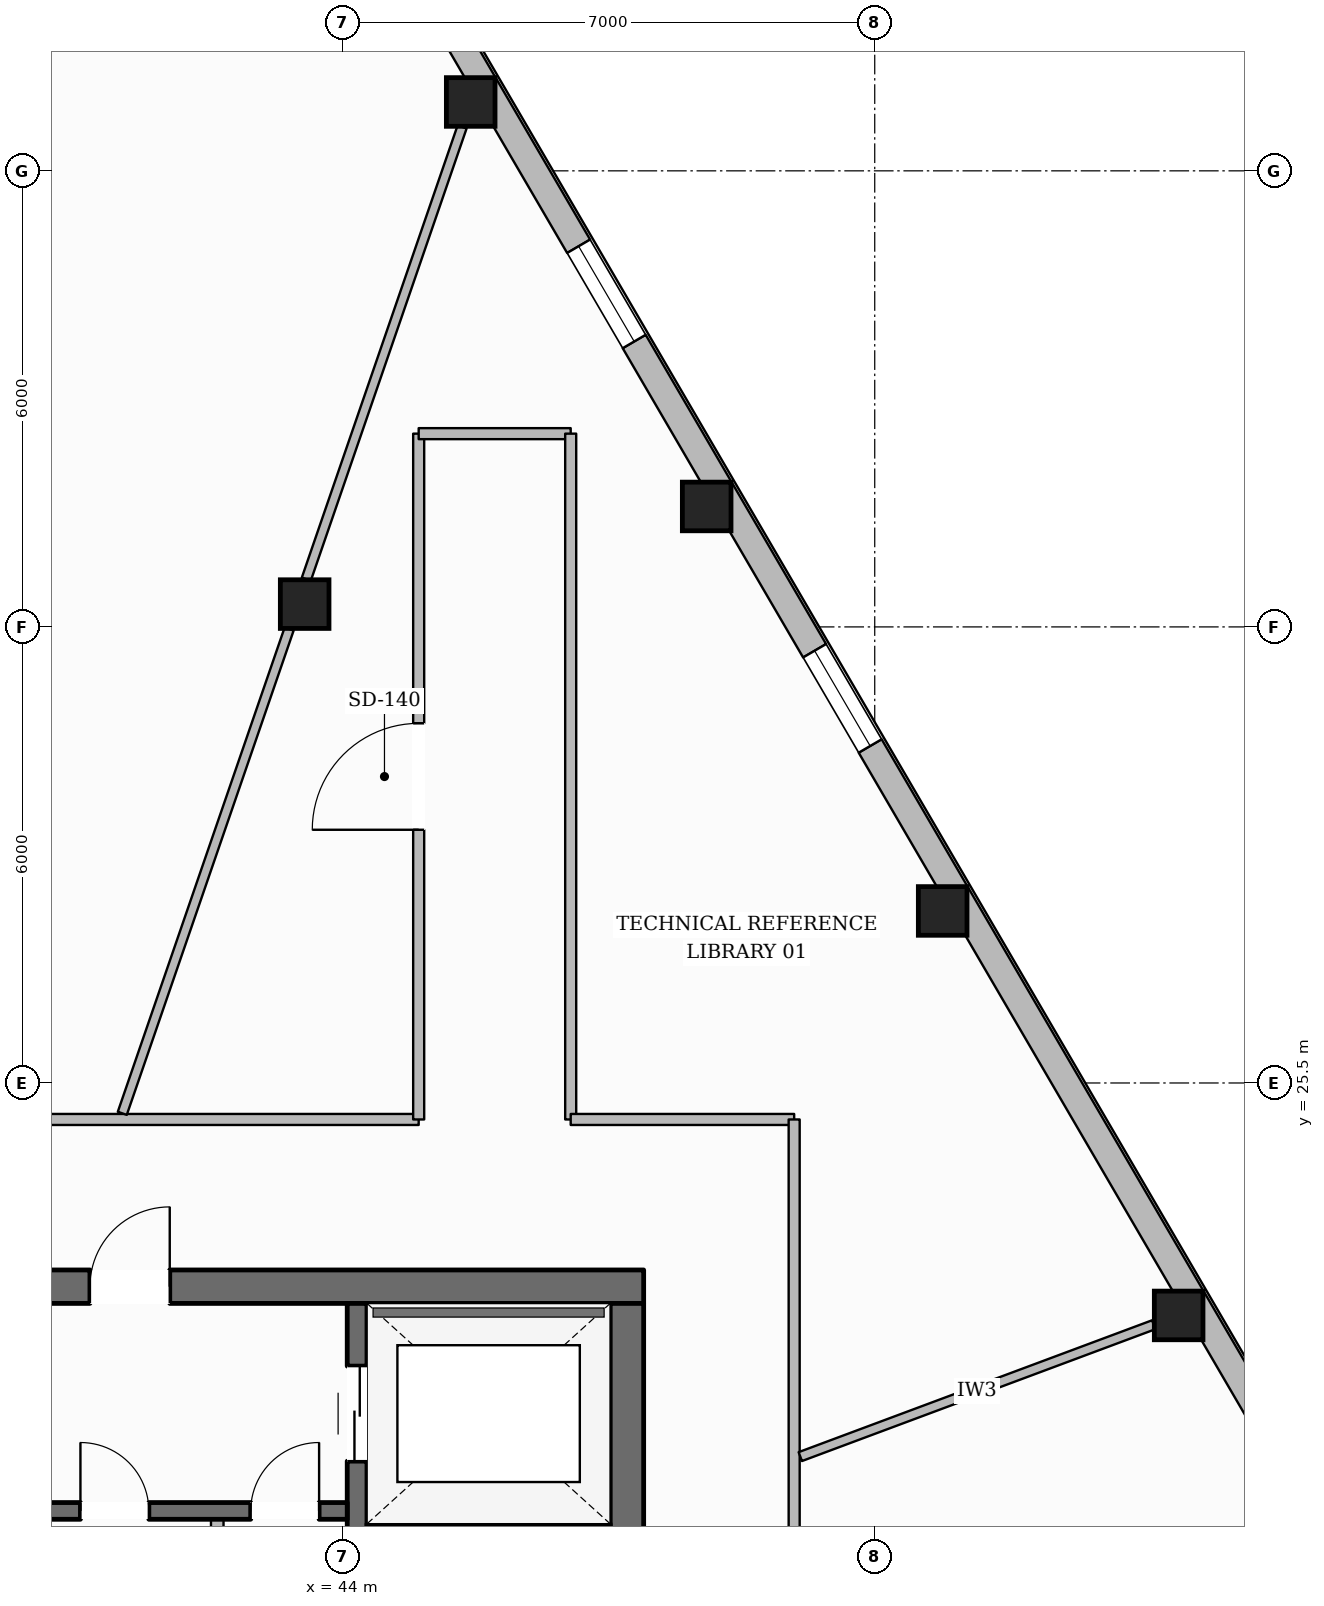
"""IFC4 building model, lengths in metres.
Left out: names, types, materials, properties, quantities, classifications, styles, units other than length and angle.
Written with IfcOpenShell. Run it as: python <this file> out.ifc"""

import sys

from ifc_helpers import new_model, si_unit, direction, frame, frame_2d, origin, origin_2d, place, context, subcontext, project, spatial, rectangle, hollow_rectangle, extrude, element, fill, save


model = new_model("IFC4")
c1 = context("Model", 3, precision=1e-05, world=origin(), true_north=direction((0.0, 1.0)))
c2 = subcontext(c1, "Body", "Model", "MODEL_VIEW")
j1 = project(units=[si_unit("LENGTHUNIT", "METRE"), si_unit("PLANEANGLEUNIT", "RADIAN")], contexts=[c1])
p1 = place(None, origin())
s1 = spatial("IfcSite", under=j1, at=p1, CompositionType="ELEMENT")
p2 = place(p1, origin())
s2 = spatial("IfcBuilding", under=s1, at=p2, CompositionType="ELEMENT")
p3 = place(p2, frame((0.0, 0.0, 188.1)))
s3 = spatial("IfcBuildingStorey", under=s2, at=p3, CompositionType="ELEMENT", Elevation=188.1)
p4 = place(p3, frame((28.04, 22.82, 0.0), z_axis=(0.0, 0.0, 1.0), x_axis=(1.0, 0.0, 0.0)))
e1 = element("IfcWall", 1, at=p4, inside=s3, PredefinedType="SOLIDWALL", context=c2, shape_type="SweptSolid", body=[
    extrude(rectangle(XDim=19.92, YDim=0.44, at=frame_2d((9.96, 0.0))), origin(), (0.0, 0.0, 1.0), 3.6),
])
p5 = place(p4, frame((6.235, 0.0, 0.0)))
e2 = element("IfcOpeningElement", 2, at=p5, cuts=e1, PredefinedType="OPENING", context=c2, shape_type="SweptSolid", body=[
    extrude(rectangle(XDim=1.05, YDim=2.15, at=frame_2d((0.525, 1.075))), frame((0.0, 0.23, 0.0), z_axis=(0.0, -1.0, 0.0), x_axis=(1.0, 0.0, 0.0)), (0.0, 0.0, 1.0), 0.46),
])
p6 = place(p4, frame((12.635, 0.0, 0.0)))
e3 = element("IfcOpeningElement", 3, at=p6, cuts=e1, PredefinedType="OPENING", context=c2, shape_type="SweptSolid", body=[
    extrude(rectangle(XDim=1.05, YDim=2.15, at=frame_2d((0.525, 1.075))), frame((0.0, 0.23, 0.0), z_axis=(0.0, -1.0, 0.0), x_axis=(1.0, 0.0, 0.0)), (0.0, 0.0, 1.0), 0.46),
])
p7 = place(p3, frame((47.74, 9.6, 0.0), z_axis=(0.0, 0.0, 1.0), x_axis=(0.0, 1.0, 0.0)))
e4 = element("IfcWall", 4, at=p7, inside=s3, PredefinedType="SOLIDWALL", context=c2, shape_type="SweptSolid", body=[
    extrude(rectangle(XDim=13.0, YDim=0.44, at=frame_2d((6.5, 0.0))), origin(), (0.0, 0.0, 1.0), 3.6),
])
p8 = place(p7, frame((0.2, 0.0, 0.0)))
e5 = element("IfcOpeningElement", 5, at=p8, cuts=e4, PredefinedType="OPENING", context=c2, shape_type="SweptSolid", body=[
    extrude(rectangle(XDim=1.1, YDim=2.15, at=frame_2d((0.55, 1.075))), frame((0.0, 0.23, 0.0), z_axis=(0.0, -1.0, 0.0), x_axis=(1.0, 0.0, 0.0)), (0.0, 0.0, 1.0), 0.46),
])
p9 = place(p7, frame((8.4, 0.0, 0.0)))
e6 = element("IfcOpeningElement", 6, at=p9, cuts=e4, PredefinedType="OPENING", context=c2, shape_type="SweptSolid", body=[
    extrude(rectangle(XDim=0.9, YDim=2.1, at=frame_2d((0.45, 1.05))), frame((0.0, 0.23, 0.0), z_axis=(0.0, -1.0, 0.0), x_axis=(1.0, 0.0, 0.0)), (0.0, 0.0, 1.0), 0.46),
])
p10 = place(p3, frame((44.19, 9.6, 0.0), z_axis=(0.0, 0.0, 1.0), x_axis=(0.0, 1.0, 0.0)))
e7 = element("IfcWall", 7, at=p10, inside=s3, PredefinedType="SHEAR", context=c2, shape_type="SweptSolid", body=[
    extrude(rectangle(XDim=13.0, YDim=0.26, at=frame_2d((6.5, 0.0))), origin(), (0.0, 0.0, 1.0), 3.6),
])
p11 = place(p10, frame((10.925, 0.0, 0.0)))
e8 = element("IfcOpeningElement", 8, at=p11, cuts=e7, PredefinedType="OPENING", context=c2, shape_type="SweptSolid", body=[
    extrude(rectangle(XDim=1.25, YDim=2.25, at=frame_2d((0.625, 1.125))), frame((0.0, 0.14, 0.0), z_axis=(0.0, -1.0, 0.0), x_axis=(1.0, 0.0, 0.0)), (0.0, 0.0, 1.0), 0.28),
])
p12 = place(p3, frame((44.32, 19.57, 0.0), z_axis=(0.0, 0.0, 1.0), x_axis=(1.0, 0.0, 0.0)))
e9 = element("IfcWall", 9, at=p12, inside=s3, PredefinedType="SHEAR", context=c2, shape_type="SweptSolid", body=[
    extrude(rectangle(XDim=3.2, YDim=0.26, at=frame_2d((1.6, 0.0))), origin(), (0.0, 0.0, 1.0), 3.6),
])
p13 = place(p3, frame((31.94, 19.87, 0.0), z_axis=(0.0, 0.0, 1.0), x_axis=(1.0, 0.0, 0.0)))
e10 = element("IfcWall", 10, at=p13, inside=s3, PredefinedType="SOLIDWALL", context=c2, shape_type="SweptSolid", body=[
    extrude(rectangle(XDim=12.12, YDim=0.22, at=frame_2d((6.06, 0.0))), origin(), (0.0, 0.0, 1.0), 3.6),
])
p14 = place(p13, frame((6.3, 0.0, 0.0)))
e11 = element("IfcOpeningElement", 11, at=p14, cuts=e10, PredefinedType="OPENING", context=c2, shape_type="SweptSolid", body=[
    extrude(rectangle(XDim=1.1, YDim=2.15, at=frame_2d((0.55, 1.075))), frame((0.0, 0.12, 0.0), z_axis=(0.0, -1.0, 0.0), x_axis=(1.0, 0.0, 0.0)), (0.0, 0.0, 1.0), 0.24),
])
p15 = place(p13, frame((8.61, 0.0, 0.0)))
e12 = element("IfcOpeningElement", 12, at=p15, cuts=e10, PredefinedType="OPENING", context=c2, shape_type="SweptSolid", body=[
    extrude(rectangle(XDim=0.9, YDim=2.1, at=frame_2d((0.45, 1.05))), frame((0.0, 0.12, 0.0), z_axis=(0.0, -1.0, 0.0), x_axis=(1.0, 0.0, 0.0)), (0.0, 0.0, 1.0), 0.24),
])
p16 = place(p13, frame((10.85, 0.0, 0.0)))
e13 = element("IfcOpeningElement", 13, at=p16, cuts=e10, PredefinedType="OPENING", context=c2, shape_type="SweptSolid", body=[
    extrude(rectangle(XDim=0.9, YDim=2.1, at=frame_2d((0.45, 1.05))), frame((0.0, 0.12, 0.0), z_axis=(0.0, -1.0, 0.0), x_axis=(1.0, 0.0, 0.0)), (0.0, 0.0, 1.0), 0.24),
])
for number, where, z_axis, x_axis in (
    (14, (54.998, 22.442, 0.0), (0.0, 0.0, 1.0), (1.0, 0.0, 0.0)),
    (15, (51.894, 27.763, 0.0), (0.0, 0.0, 1.0), (1.0, 0.0, 0.0)),
    (16, (48.789, 33.085, 0.0), (0.0, 0.0, 1.0), (1.0, 0.0, 0.0)),
    (17, (45.684, 38.406, 0.0), (0.0, 0.0, 1.0), (1.0, 0.0, 0.0)),
    (18, (43.5, 31.8, 0.0), (0.0, 0.0, 1.0), (1.0, 0.0, 0.0)),
):
    element("IfcColumn", number, at=place(p3, frame(where, z_axis=z_axis, x_axis=x_axis)), inside=s3, PredefinedType="COLUMN", context=c2, shape_type="SweptSolid", body=[
        extrude(hollow_rectangle(XDim=0.64, YDim=0.64, WallThickness=0.028, at=origin_2d()), origin(), (0.0, 0.0, 1.0), 3.6),
    ])
p17 = place(p3, frame((42.575, 44.272, 0.0), z_axis=(0.0, 0.0, 1.0), x_axis=(0.503934681705, -0.863741764982, 0.0)))
e19 = element("IfcWall", 19, at=p17, inside=s3, PredefinedType="STANDARD", context=c2, shape_type="SweptSolid", body=[
    extrude(rectangle(XDim=37.915, YDim=0.35, at=frame_2d((18.958, 0.0))), origin(), (0.0, 0.0, 1.0), 3.132),
])
p18 = place(p17, frame((33.633, 0.0, 0.65)))
e20 = element("IfcOpeningElement", 20, at=p18, cuts=e19, PredefinedType="OPENING", context=c2, shape_type="SweptSolid", body=[
    extrude(rectangle(XDim=1.45, YDim=1.75, at=frame_2d((0.725, 0.875))), frame((0.0, 0.185, 0.0), z_axis=(0.0, -1.0, 0.0), x_axis=(1.0, 0.0, 0.0)), (0.0, 0.0, 1.0), 0.37),
])
p19 = place(p17, frame((27.472, 0.0, 0.65)))
e21 = element("IfcOpeningElement", 21, at=p19, cuts=e19, PredefinedType="OPENING", context=c2, shape_type="SweptSolid", body=[
    extrude(rectangle(XDim=1.45, YDim=1.75, at=frame_2d((0.725, 0.875))), frame((0.0, 0.185, 0.0), z_axis=(0.0, -1.0, 0.0), x_axis=(1.0, 0.0, 0.0)), (0.0, 0.0, 1.0), 0.37),
])
p20 = place(p17, frame((15.15, 0.0, 0.65)))
e22 = element("IfcOpeningElement", 22, at=p20, cuts=e19, PredefinedType="OPENING", context=c2, shape_type="SweptSolid", body=[
    extrude(rectangle(XDim=1.45, YDim=1.75, at=frame_2d((0.725, 0.875))), frame((0.0, 0.185, 0.0), z_axis=(0.0, -1.0, 0.0), x_axis=(1.0, 0.0, 0.0)), (0.0, 0.0, 1.0), 0.37),
])
p21 = place(p17, frame((8.989, 0.0, 0.65)))
e23 = element("IfcOpeningElement", 23, at=p21, cuts=e19, PredefinedType="OPENING", context=c2, shape_type="SweptSolid", body=[
    extrude(rectangle(XDim=1.45, YDim=1.75, at=frame_2d((0.725, 0.875))), frame((0.0, 0.185, 0.0), z_axis=(0.0, -1.0, 0.0), x_axis=(1.0, 0.0, 0.0)), (0.0, 0.0, 1.0), 0.37),
])
p22 = place(p17, frame((2.828, 0.0, 0.65)))
e24 = element("IfcOpeningElement", 24, at=p22, cuts=e19, PredefinedType="OPENING", context=c2, shape_type="SweptSolid", body=[
    extrude(rectangle(XDim=1.45, YDim=1.75, at=frame_2d((0.725, 0.875))), frame((0.0, 0.185, 0.0), z_axis=(0.0, -1.0, 0.0), x_axis=(1.0, 0.0, 0.0)), (0.0, 0.0, 1.0), 0.37),
])
p23 = place(p3, frame((42.35, 16.56, 0.0), z_axis=(0.0, 0.0, 1.0), x_axis=(0.0, 1.0, 0.0)))
e25 = element("IfcWall", 25, at=p23, inside=s3, PredefinedType="PARTITIONING", context=c2, shape_type="SweptSolid", body=[
    extrude(rectangle(XDim=3.2, YDim=0.165, at=frame_2d((1.6, 0.0))), origin(), (0.0, 0.0, 1.0), 3.6),
])
p24 = place(p3, frame((31.0, 25.02, 0.0), z_axis=(0.0, 0.0, 1.0), x_axis=(1.0, 0.0, 0.0)))
e26 = element("IfcWall", 26, at=p24, inside=s3, PredefinedType="PARTITIONING", context=c2, shape_type="SweptSolid", body=[
    extrude(rectangle(XDim=14.0, YDim=0.145, at=frame_2d((7.0, 0.0))), origin(), (0.0, 0.0, 1.0), 3.6),
])
p25 = place(p24, frame((4.434, 0.0, 0.0)))
e27 = element("IfcOpeningElement", 27, at=p25, cuts=e26, PredefinedType="OPENING", context=c2, shape_type="SweptSolid", body=[
    extrude(rectangle(XDim=1.4, YDim=2.2, at=frame_2d((0.7, 1.1))), frame((0.0, 0.083, 0.0), z_axis=(0.0, -1.0, 0.0), x_axis=(1.0, 0.0, 0.0)), (0.0, 0.0, 1.0), 0.165),
])
p26 = place(p3, frame((45.0, 25.02, 0.0), z_axis=(0.0, 0.0, 1.0), x_axis=(0.0, 1.0, 0.0)))
e28 = element("IfcWall", 28, at=p26, inside=s3, PredefinedType="PARTITIONING", context=c2, shape_type="SweptSolid", body=[
    extrude(rectangle(XDim=9.022, YDim=0.145, at=frame_2d((4.511, 0.0))), origin(), (0.0, 0.0, 1.0), 3.6),
])
p27 = place(p26, frame((3.811, 0.0, 0.0)))
e29 = element("IfcOpeningElement", 29, at=p27, cuts=e28, PredefinedType="OPENING", context=c2, shape_type="SweptSolid", body=[
    extrude(rectangle(XDim=1.4, YDim=2.2, at=frame_2d((0.7, 1.1))), frame((0.0, 0.083, 0.0), z_axis=(0.0, -1.0, 0.0), x_axis=(1.0, 0.0, 0.0)), (0.0, 0.0, 1.0), 0.165),
])
p28 = place(p3, frame((45.0, 34.042, 0.0), z_axis=(0.0, 0.0, 1.0), x_axis=(1.0, 0.0, 0.0)))
e30 = element("IfcWall", 30, at=p28, inside=s3, PredefinedType="PARTITIONING", context=c2, shape_type="SweptSolid", body=[
    extrude(rectangle(XDim=2.0, YDim=0.145, at=frame_2d((1.0, 0.0))), origin(), (0.0, 0.0, 1.0), 3.6),
])
p29 = place(p3, frame((47.0, 34.042, 0.0), z_axis=(0.0, 0.0, 1.0), x_axis=(0.0, -1.0, 0.0)))
e31 = element("IfcWall", 31, at=p29, inside=s3, PredefinedType="PARTITIONING", context=c2, shape_type="SweptSolid", body=[
    extrude(rectangle(XDim=9.022, YDim=0.145, at=frame_2d((4.511, 0.0))), origin(), (0.0, 0.0, 1.0), 3.6),
])
p30 = place(p3, frame((47.0, 25.02, 0.0), z_axis=(0.0, 0.0, 1.0), x_axis=(1.0, 0.0, 0.0)))
e32 = element("IfcWall", 32, at=p30, inside=s3, PredefinedType="PARTITIONING", context=c2, shape_type="SweptSolid", body=[
    extrude(rectangle(XDim=2.94, YDim=0.145, at=frame_2d((1.47, 0.0))), origin(), (0.0, 0.0, 1.0), 3.6),
])
p31 = place(p3, frame((49.94, 25.02, 0.0), z_axis=(0.0, 0.0, 1.0), x_axis=(0.0, -1.0, 0.0)))
e33 = element("IfcWall", 33, at=p31, inside=s3, PredefinedType="PARTITIONING", context=c2, shape_type="SweptSolid", body=[
    extrude(rectangle(XDim=7.92, YDim=0.145, at=frame_2d((3.96, 0.0))), origin(), (0.0, 0.0, 1.0), 3.339),
])
p32 = place(p3, frame((50.021, 20.585, 0.0), z_axis=(0.0, 0.0, 1.0), x_axis=(0.936930245376, 0.349516402047, 0.0)))
e34 = element("IfcWall", 34, at=p32, inside=s3, PredefinedType="PARTITIONING", context=c2, shape_type="SweptSolid", body=[
    extrude(rectangle(XDim=4.963, YDim=0.125, at=frame_2d((2.481, 0.0))), origin(), (0.0, 0.0, 1.0), 3.6),
])
p33 = place(p3, frame((41.101, 25.101, 0.0), z_axis=(0.0, 0.0, 1.0), x_axis=(0.325732757855, 0.945461882077, 0.0)))
e35 = element("IfcWall", 35, at=p33, inside=s3, PredefinedType="PARTITIONING", context=c2, shape_type="SweptSolid", body=[
    extrude(rectangle(XDim=6.739, YDim=0.125, at=frame_2d((3.369, 0.0))), origin(), (0.0, 0.0, 1.0), 3.141),
])
p34 = place(p3, frame((43.521, 32.128, 0.0), z_axis=(0.0, 0.0, 1.0), x_axis=(0.325720467461, 0.945466116303, 0.0)))
e36 = element("IfcWall", 36, at=p34, inside=s3, PredefinedType="PARTITIONING", context=c2, shape_type="SweptSolid", body=[
    extrude(rectangle(XDim=6.293, YDim=0.125, at=frame_2d((3.146, 0.0))), origin(), (0.0, 0.0, 1.0), 3.6),
])
p35 = place(p20, origin())
e37 = element("IfcWindow", 37, at=p35, inside=s3, PartitioningType="SINGLE_PANEL", PredefinedType="WINDOW", context=c2, shape_type="SweptSolid", body=[
    extrude(rectangle(XDim=1.45, YDim=1.75, at=frame_2d((0.725, 0.875))), frame((0.0, 0.03, 0.0), z_axis=(0.0, -1.0, 0.0), x_axis=(1.0, 0.0, 0.0)), (0.0, 0.0, 1.0), 0.06),
])
fill(e22, e37)
p36 = place(p21, origin())
e38 = element("IfcWindow", 38, at=p36, inside=s3, PartitioningType="SINGLE_PANEL", PredefinedType="WINDOW", context=c2, shape_type="SweptSolid", body=[
    extrude(rectangle(XDim=1.45, YDim=1.75, at=frame_2d((0.725, 0.875))), frame((0.0, 0.03, 0.0), z_axis=(0.0, -1.0, 0.0), x_axis=(1.0, 0.0, 0.0)), (0.0, 0.0, 1.0), 0.06),
])
fill(e23, e38)
p37 = place(p6, origin())
e39 = element("IfcDoor", 39, at=p37, inside=s3, OperationType="SINGLE_SWING_RIGHT", PredefinedType="DOOR", context=c2, shape_type="SweptSolid", body=[
    extrude(rectangle(XDim=1.05, YDim=2.15, at=frame_2d((0.525, 1.075))), frame((0.0, 0.025, 0.0), z_axis=(0.0, -1.0, 0.0), x_axis=(1.0, 0.0, 0.0)), (0.0, 0.0, 1.0), 0.05),
])
fill(e3, e39)
p38 = place(p11, origin())
e40 = element("IfcDoor", 40, at=p38, inside=s3, OperationType="DOUBLE_DOOR_SLIDING", PredefinedType="DOOR", context=c2, shape_type="SweptSolid", body=[
    extrude(rectangle(XDim=1.25, YDim=2.25, at=frame_2d((0.625, 1.125))), frame((0.0, 0.025, 0.0), z_axis=(0.0, -1.0, 0.0), x_axis=(1.0, 0.0, 0.0)), (0.0, 0.0, 1.0), 0.05),
])
fill(e8, e40)
p39 = place(p15, origin())
e41 = element("IfcDoor", 41, at=p39, inside=s3, OperationType="SINGLE_SWING_LEFT", PredefinedType="DOOR", context=c2, shape_type="SweptSolid", body=[
    extrude(rectangle(XDim=0.9, YDim=2.1, at=frame_2d((0.45, 1.05))), frame((0.0, 0.025, 0.0), z_axis=(0.0, -1.0, 0.0), x_axis=(1.0, 0.0, 0.0)), (0.0, 0.0, 1.0), 0.05),
])
fill(e12, e41)
p40 = place(p16, origin())
e42 = element("IfcDoor", 42, at=p40, inside=s3, OperationType="SINGLE_SWING_RIGHT", PredefinedType="DOOR", context=c2, shape_type="SweptSolid", body=[
    extrude(rectangle(XDim=0.9, YDim=2.1, at=frame_2d((0.45, 1.05))), frame((0.0, 0.025, 0.0), z_axis=(0.0, -1.0, 0.0), x_axis=(1.0, 0.0, 0.0)), (0.0, 0.0, 1.0), 0.05),
])
fill(e13, e42)
p41 = place(p27, origin())
e43 = element("IfcDoor", 43, at=p41, inside=s3, OperationType="SINGLE_SWING_LEFT", PredefinedType="DOOR", context=c2, shape_type="SweptSolid", body=[
    extrude(rectangle(XDim=1.4, YDim=2.2, at=frame_2d((0.7, 1.1))), frame((0.0, 0.025, 0.0), z_axis=(0.0, -1.0, 0.0), x_axis=(1.0, 0.0, 0.0)), (0.0, 0.0, 1.0), 0.05),
])
fill(e29, e43)
save(model, sys.argv[1])
